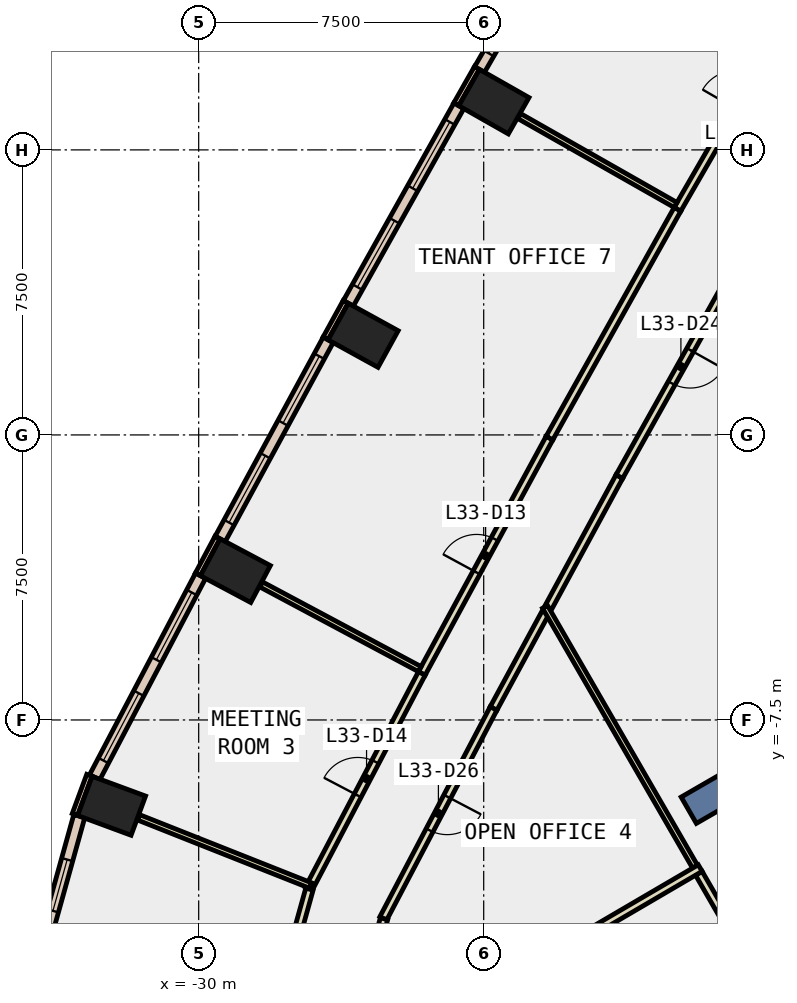
"""IFC4 building model, lengths in metres.
Left out: names, types, materials, properties, quantities, classifications, styles, units other than length and angle.
Written with IfcOpenShell. Run it as: python <this file> out.ifc"""

import sys

from ifc_helpers import new_model, si_unit, direction, frame, frame_2d, origin, origin_2d, place, context, subcontext, project, spatial, rectangle, extrude, element, fill, save


model = new_model("IFC4")
c1 = context("Model", 3, precision=1e-05, world=origin(), true_north=direction((0.0, 1.0)))
c2 = subcontext(c1, "Body", "Model", "MODEL_VIEW")
j1 = project(units=[si_unit("LENGTHUNIT", "METRE"), si_unit("PLANEANGLEUNIT", "RADIAN")], contexts=[c1])
p1 = place(None, origin())
s1 = spatial("IfcSite", under=j1, at=p1, CompositionType="ELEMENT")
p2 = place(p1, origin())
s2 = spatial("IfcBuilding", under=s1, at=p2, CompositionType="ELEMENT")
p3 = place(p2, frame((0.0, 0.0, 150.8)))
s3 = spatial("IfcBuildingStorey", under=s2, at=p3, CompositionType="ELEMENT", Elevation=150.8)
for number, where, z_axis, x_axis in (
    (1, (-22.232, 8.769, -0.4), (0.0, 0.0, 1.0), (0.494, 0.869, 0.0)),
    (2, (-25.673, 2.622, -0.4), (0.0, 0.0, 1.0), (0.482, 0.876, 0.0)),
    (3, (-29.034, -3.571, -0.4), (0.0, 0.0, 1.0), (0.47, 0.883, 0.0)),
    (4, (-32.292, -9.758, -0.4), (0.0, 0.0, 1.0), (0.347, 0.938, 0.0)),
):
    element("IfcColumn", number, at=place(p3, frame(where, z_axis=z_axis, x_axis=x_axis)), inside=s3, PredefinedType="COLUMN", context=c2, shape_type="SweptSolid", body=[
        extrude(rectangle(XDim=1.1, YDim=1.5, at=origin_2d()), origin(), (0.0, 0.0, 1.0), 4.2),
    ])
p4 = place(p3, frame((-9.31, -5.375, -0.4), z_axis=(0.0, 0.0, 1.0), x_axis=(-0.866017533419, -0.500013631625, 0.0)))
e5 = element("IfcWall", 5, at=p4, inside=s3, PredefinedType="SHEAR", context=c2, shape_type="SweptSolid", body=[
    extrude(rectangle(XDim=9.0, YDim=0.8, at=frame_2d((4.5, 0.0))), origin(), (0.0, 0.0, 1.0), 4.2),
])
for number, where, z_axis, x_axis in (
    (6, (-22.678, 9.655, 0.0), (0.0, 0.0, 1.0), (-0.495, -0.869, 0.0)),
    (7, (-26.131, 3.502, 0.0), (0.0, 0.0, 1.0), (-0.482, -0.876, 0.0)),
):
    element("IfcWall", number, at=place(p3, frame(where, z_axis=z_axis, x_axis=x_axis)), inside=s3, PredefinedType="STANDARD", context=c2, shape_type="SweptSolid", body=[
        extrude(rectangle(XDim=1.1, YDim=0.15, at=frame_2d((0.55, 0.0))), origin(), (0.0, 0.0, 1.0), 3.8),
    ])
for number, where, z_axis, x_axis in (
    (8, (-29.503, -2.698, 0.0), (0.0, 0.0, 1.0), (-0.47, -0.883, 0.0)),
    (9, (-32.875, -8.956, 0.0), (0.0, 0.0, 1.0), (-0.346, -0.938, 0.0)),
):
    element("IfcWall", number, at=place(p3, frame(where, z_axis=z_axis, x_axis=x_axis)), inside=s3, PredefinedType="STANDARD", context=c2, shape_type="SweptSolid", body=[
        extrude(rectangle(XDim=1.1, YDim=0.15, at=frame_2d((0.55, 0.0))), origin(), (0.0, 0.0, 1.0), 3.8),
    ])
p5 = place(p3, frame((-19.631, 14.774, 0.0), z_axis=(0.0, 0.0, 1.0), x_axis=(-0.500061823953, -0.865989706766, 0.0)))
e10 = element("IfcWall", 10, at=p5, inside=s3, PredefinedType="STANDARD", context=c2, shape_type="SweptSolid", body=[
    extrude(rectangle(XDim=5.957, YDim=0.3, at=frame_2d((2.979, 0.0))), origin(), (0.0, 0.0, 1.0), 3.8),
])
p6 = place(p5, frame((0.489, 0.0, 0.9)))
e11 = element("IfcOpeningElement", 11, at=p6, cuts=e10, PredefinedType="OPENING", context=c2, shape_type="SweptSolid", body=[
    extrude(rectangle(XDim=2.0, YDim=2.6, at=frame_2d((1.0, 1.3))), frame((0.0, 0.16, 0.0), z_axis=(0.0, -1.0, 0.0), x_axis=(1.0, 0.0, 0.0)), (0.0, 0.0, 1.0), 0.32),
])
p7 = place(p5, frame((3.468, 0.0, 0.9)))
e12 = element("IfcOpeningElement", 12, at=p7, cuts=e10, PredefinedType="OPENING", context=c2, shape_type="SweptSolid", body=[
    extrude(rectangle(XDim=2.0, YDim=2.6, at=frame_2d((1.0, 1.3))), frame((0.0, 0.16, 0.0), z_axis=(0.0, -1.0, 0.0), x_axis=(1.0, 0.0, 0.0)), (0.0, 0.0, 1.0), 0.32),
])
p8 = place(p3, frame((-23.153, 8.661, 0.0), z_axis=(0.0, 0.0, 1.0), x_axis=(-0.488354983501, -0.872645065356, 0.0)))
e13 = element("IfcWall", 13, at=p8, inside=s3, PredefinedType="STANDARD", context=c2, shape_type="SweptSolid", body=[
    extrude(rectangle(XDim=5.957, YDim=0.3, at=frame_2d((2.978, 0.0))), origin(), (0.0, 0.0, 1.0), 3.8),
])
p9 = place(p8, frame((0.489, 0.0, 0.9)))
e14 = element("IfcOpeningElement", 14, at=p9, cuts=e13, PredefinedType="OPENING", context=c2, shape_type="SweptSolid", body=[
    extrude(rectangle(XDim=2.0, YDim=2.6, at=frame_2d((1.0, 1.3))), frame((0.0, 0.16, 0.0), z_axis=(0.0, -1.0, 0.0), x_axis=(1.0, 0.0, 0.0)), (0.0, 0.0, 1.0), 0.32),
])
p10 = place(p8, frame((3.467, 0.0, 0.9)))
e15 = element("IfcOpeningElement", 15, at=p10, cuts=e13, PredefinedType="OPENING", context=c2, shape_type="SweptSolid", body=[
    extrude(rectangle(XDim=2.0, YDim=2.6, at=frame_2d((1.0, 1.3))), frame((0.0, 0.16, 0.0), z_axis=(0.0, -1.0, 0.0), x_axis=(1.0, 0.0, 0.0)), (0.0, 0.0, 1.0), 0.32),
])
p11 = place(p3, frame((-26.592, 2.501, 0.0), z_axis=(0.0, 0.0, 1.0), x_axis=(-0.476970695077, -0.878919197673, 0.0)))
e16 = element("IfcWall", 16, at=p11, inside=s3, PredefinedType="STANDARD", context=c2, shape_type="SweptSolid", body=[
    extrude(rectangle(XDim=5.958, YDim=0.3, at=frame_2d((2.979, 0.0))), origin(), (0.0, 0.0, 1.0), 3.8),
])
p12 = place(p11, frame((0.49, 0.0, 0.9)))
e17 = element("IfcOpeningElement", 17, at=p12, cuts=e16, PredefinedType="OPENING", context=c2, shape_type="SweptSolid", body=[
    extrude(rectangle(XDim=2.0, YDim=2.6, at=frame_2d((1.0, 1.3))), frame((0.0, 0.16, 0.0), z_axis=(0.0, -1.0, 0.0), x_axis=(1.0, 0.0, 0.0)), (0.0, 0.0, 1.0), 0.32),
])
p13 = place(p11, frame((3.469, 0.0, 0.9)))
e18 = element("IfcOpeningElement", 18, at=p13, cuts=e16, PredefinedType="OPENING", context=c2, shape_type="SweptSolid", body=[
    extrude(rectangle(XDim=2.0, YDim=2.6, at=frame_2d((1.0, 1.3))), frame((0.0, 0.16, 0.0), z_axis=(0.0, -1.0, 0.0), x_axis=(1.0, 0.0, 0.0)), (0.0, 0.0, 1.0), 0.32),
])
p14 = place(p3, frame((-29.951, -3.705, 0.0), z_axis=(0.0, 0.0, 1.0), x_axis=(-0.465104650407, -0.885255705528, 0.0)))
e19 = element("IfcWall", 19, at=p14, inside=s3, PredefinedType="STANDARD", context=c2, shape_type="SweptSolid", body=[
    extrude(rectangle(XDim=5.99, YDim=0.3, at=frame_2d((2.995, 0.0))), origin(), (0.0, 0.0, 1.0), 3.8),
])
p15 = place(p14, frame((0.498, 0.0, 0.9)))
e20 = element("IfcOpeningElement", 20, at=p15, cuts=e19, PredefinedType="OPENING", context=c2, shape_type="SweptSolid", body=[
    extrude(rectangle(XDim=2.0, YDim=2.6, at=frame_2d((1.0, 1.3))), frame((0.0, 0.16, 0.0), z_axis=(0.0, -1.0, 0.0), x_axis=(1.0, 0.0, 0.0)), (0.0, 0.0, 1.0), 0.32),
])
p16 = place(p14, frame((3.493, 0.0, 0.9)))
e21 = element("IfcOpeningElement", 21, at=p16, cuts=e19, PredefinedType="OPENING", context=c2, shape_type="SweptSolid", body=[
    extrude(rectangle(XDim=2.0, YDim=2.6, at=frame_2d((1.0, 1.3))), frame((0.0, 0.16, 0.0), z_axis=(0.0, -1.0, 0.0), x_axis=(1.0, 0.0, 0.0)), (0.0, 0.0, 1.0), 0.32),
])
p17 = place(p3, frame((-33.142, -10.029, 0.0), z_axis=(0.0, 0.0, 1.0), x_axis=(-0.26799398221, -0.963420585985, 0.0)))
e22 = element("IfcWall", 22, at=p17, inside=s3, PredefinedType="STANDARD", context=c2, shape_type="SweptSolid", body=[
    extrude(rectangle(XDim=3.776, YDim=0.3, at=frame_2d((1.888, 0.0))), origin(), (0.0, 0.0, 1.0), 3.8),
])
p18 = place(p17, frame((1.188, 0.0, 0.9)))
e23 = element("IfcOpeningElement", 23, at=p18, cuts=e22, PredefinedType="OPENING", context=c2, shape_type="SweptSolid", body=[
    extrude(rectangle(XDim=1.4, YDim=2.6, at=frame_2d((0.7, 1.3))), frame((0.0, 0.16, 0.0), z_axis=(0.0, -1.0, 0.0), x_axis=(1.0, 0.0, 0.0)), (0.0, 0.0, 1.0), 0.32),
])
p19 = place(p3, frame((-18.93, -1.095, 0.0), z_axis=(0.0, 0.0, 1.0), x_axis=(-0.476854303058, -0.878982351162, 0.0)))
e24 = element("IfcWall", 24, at=p19, inside=s3, PredefinedType="PARTITIONING", context=c2, shape_type="SweptSolid", body=[
    extrude(rectangle(XDim=3.924, YDim=0.2, at=frame_2d((1.962, 0.0))), origin(), (0.0, 0.0, 1.0), 3.8),
])
p20 = place(p3, frame((-15.692, 4.689, 0.0), z_axis=(0.0, 0.0, 1.0), x_axis=(-0.48849233301, -0.872568186786, 0.0)))
e25 = element("IfcWall", 25, at=p20, inside=s3, PredefinedType="PARTITIONING", context=c2, shape_type="SweptSolid", body=[
    extrude(rectangle(XDim=6.629, YDim=0.2, at=frame_2d((3.314, 0.0))), origin(), (0.0, 0.0, 1.0), 3.8),
])
p21 = place(p20, frame((2.814, 0.0, 0.0)))
e26 = element("IfcOpeningElement", 26, at=p21, cuts=e25, PredefinedType="OPENING", context=c2, shape_type="SweptSolid", body=[
    extrude(rectangle(XDim=1.0, YDim=2.1, at=frame_2d((0.5, 1.05))), frame((0.0, 0.11, 0.0), z_axis=(0.0, -1.0, 0.0), x_axis=(1.0, 0.0, 0.0)), (0.0, 0.0, 1.0), 0.22),
])
p22 = place(p3, frame((-20.873, -4.676, 0.0), z_axis=(0.0, 0.0, 1.0), x_axis=(-0.476781985736, -0.879021579984, 0.0)))
e27 = element("IfcWall", 27, at=p22, inside=s3, PredefinedType="PARTITIONING", context=c2, shape_type="SweptSolid", body=[
    extrude(rectangle(XDim=2.869, YDim=0.2, at=frame_2d((1.435, 0.0))), origin(), (0.0, 0.0, 1.0), 3.8),
])
p23 = place(p3, frame((-22.241, -7.198, 0.0), z_axis=(0.0, 0.0, 1.0), x_axis=(-0.465089990515, -0.885263407536, 0.0)))
e28 = element("IfcWall", 28, at=p23, inside=s3, PredefinedType="PARTITIONING", context=c2, shape_type="SweptSolid", body=[
    extrude(rectangle(XDim=6.24, YDim=0.2, at=frame_2d((3.12, 0.0))), origin(), (0.0, 0.0, 1.0), 3.8),
])
p24 = place(p23, frame((2.62, 0.0, 0.0)))
e29 = element("IfcOpeningElement", 29, at=p24, cuts=e28, PredefinedType="OPENING", context=c2, shape_type="SweptSolid", body=[
    extrude(rectangle(XDim=1.0, YDim=2.1, at=frame_2d((0.5, 1.05))), frame((0.0, 0.11, 0.0), z_axis=(0.0, -1.0, 0.0), x_axis=(1.0, 0.0, 0.0)), (0.0, 0.0, 1.0), 0.22),
])
p25 = place(p3, frame((-25.123, -12.73, 0.0), z_axis=(0.0, 0.0, 1.0), x_axis=(-0.268139825244, -0.963380005044, 0.0)))
e30 = element("IfcWall", 30, at=p25, inside=s3, PredefinedType="PARTITIONING", context=c2, shape_type="SweptSolid", body=[
    extrude(rectangle(XDim=1.726, YDim=0.2, at=frame_2d((0.863, 0.0))), origin(), (0.0, 0.0, 1.0), 3.8),
])
p26 = place(p3, frame((-17.402, 5.936, 0.0), z_axis=(0.0, 0.0, 1.0), x_axis=(0.500135788517, 0.865946992052, 0.0)))
e31 = element("IfcWall", 31, at=p26, inside=s3, PredefinedType="PARTITIONING", context=c2, shape_type="SweptSolid", body=[
    extrude(rectangle(XDim=6.97, YDim=0.2, at=frame_2d((3.485, 0.0))), origin(), (0.0, 0.0, 1.0), 3.8),
])
p27 = place(p26, frame((3.06, 0.0, 0.0)))
e32 = element("IfcOpeningElement", 32, at=p27, cuts=e31, PredefinedType="OPENING", context=c2, shape_type="SweptSolid", body=[
    extrude(rectangle(XDim=1.0, YDim=2.1, at=frame_2d((0.5, 1.05))), frame((0.0, 0.11, 0.0), z_axis=(0.0, -1.0, 0.0), x_axis=(1.0, 0.0, 0.0)), (0.0, 0.0, 1.0), 0.22),
])
p28 = place(p3, frame((-24.13, -6.275, 0.0), z_axis=(0.0, 0.0, 1.0), x_axis=(0.476981750532, 0.878913198023, 0.0)))
e33 = element("IfcWall", 33, at=p28, inside=s3, PredefinedType="PARTITIONING", context=c2, shape_type="SweptSolid", body=[
    extrude(rectangle(XDim=7.046, YDim=0.2, at=frame_2d((3.523, 0.0))), origin(), (0.0, 0.0, 1.0), 3.8),
])
p29 = place(p28, frame((3.023, 0.0, 0.0)))
e34 = element("IfcOpeningElement", 34, at=p29, cuts=e33, PredefinedType="OPENING", context=c2, shape_type="SweptSolid", body=[
    extrude(rectangle(XDim=1.0, YDim=2.1, at=frame_2d((0.5, 1.05))), frame((0.0, 0.11, 0.0), z_axis=(0.0, -1.0, 0.0), x_axis=(1.0, 0.0, 0.0)), (0.0, 0.0, 1.0), 0.22),
])
p30 = place(p3, frame((-20.769, -0.082, 0.0), z_axis=(0.0, 0.0, 1.0), x_axis=(0.488387759141, 0.872626722443, 0.0)))
e35 = element("IfcWall", 35, at=p30, inside=s3, PredefinedType="PARTITIONING", context=c2, shape_type="SweptSolid", body=[
    extrude(rectangle(XDim=6.896, YDim=0.2, at=frame_2d((3.448, 0.0))), origin(), (0.0, 0.0, 1.0), 3.8),
])
p31 = place(p3, frame((-27.106, -11.944, 0.0), z_axis=(0.0, 0.0, 1.0), x_axis=(0.464985599417, 0.885318243534, 0.0)))
e36 = element("IfcWall", 36, at=p31, inside=s3, PredefinedType="PARTITIONING", context=c2, shape_type="SweptSolid", body=[
    extrude(rectangle(XDim=6.402, YDim=0.2, at=frame_2d((3.201, 0.0))), origin(), (0.0, 0.0, 1.0), 3.8),
])
p32 = place(p31, frame((2.776, 0.0, 0.0)))
e37 = element("IfcOpeningElement", 37, at=p32, cuts=e36, PredefinedType="OPENING", context=c2, shape_type="SweptSolid", body=[
    extrude(rectangle(XDim=1.0, YDim=2.1, at=frame_2d((0.5, 1.05))), frame((0.0, 0.11, 0.0), z_axis=(0.0, -1.0, 0.0), x_axis=(1.0, 0.0, 0.0)), (0.0, 0.0, 1.0), 0.22),
])
p33 = place(p3, frame((-27.76, -14.376, 0.0), z_axis=(0.0, 0.0, 1.0), x_axis=(0.267909096687, 0.963444194498, 0.0)))
e38 = element("IfcWall", 38, at=p33, inside=s3, PredefinedType="PARTITIONING", context=c2, shape_type="SweptSolid", body=[
    extrude(rectangle(XDim=2.516, YDim=0.2, at=frame_2d((1.258, 0.0))), origin(), (0.0, 0.0, 1.0), 3.8),
])
p34 = place(p3, frame((-16.939, -11.36, 0.0), z_axis=(0.0, 0.0, 1.0), x_axis=(-0.500053473428, 0.865994528685, 0.0)))
e39 = element("IfcWall", 39, at=p34, inside=s3, PredefinedType="PARTITIONING", context=c2, shape_type="SweptSolid", body=[
    extrude(rectangle(XDim=7.895, YDim=0.15, at=frame_2d((3.948, 0.0))), origin(), (0.0, 0.0, 1.0), 3.8),
])
p35 = place(p3, frame((-15.18, -14.408, 0.0), z_axis=(0.0, 0.0, 1.0), x_axis=(-0.499968694491, 0.866043477274, 0.0)))
e40 = element("IfcWall", 40, at=p35, inside=s3, PredefinedType="PARTITIONING", context=c2, shape_type="SweptSolid", body=[
    extrude(rectangle(XDim=3.319, YDim=0.2, at=frame_2d((1.659, 0.0))), origin(), (0.0, 0.0, 1.0), 3.8),
])
p36 = place(p3, frame((-16.803, -11.397, 0.0), z_axis=(0.0, 0.0, 1.0), x_axis=(-0.863203941699, -0.504855380318, 0.0)))
e41 = element("IfcWall", 41, at=p36, inside=s3, PredefinedType="PARTITIONING", context=c2, shape_type="SweptSolid", body=[
    extrude(rectangle(XDim=8.232, YDim=0.2, at=frame_2d((4.116, 0.0))), origin(), (0.0, 0.0, 1.0), 3.8),
])
p37 = place(p3, frame((-17.451, 6.051, 0.0), z_axis=(0.0, 0.0, 1.0), x_axis=(-0.869409691741, 0.494091882049, 0.0)))
e42 = element("IfcWall", 42, at=p37, inside=s3, PredefinedType="PARTITIONING", context=c2, shape_type="SweptSolid", body=[
    extrude(rectangle(XDim=4.73, YDim=0.15, at=frame_2d((2.365, 0.0))), origin(), (0.0, 0.0, 1.0), 3.8),
])
p38 = place(p3, frame((-24.182, -6.162, 0.0), z_axis=(0.0, 0.0, 1.0), x_axis=(-0.88214427755, 0.470979270866, 0.0)))
e43 = element("IfcWall", 43, at=p38, inside=s3, PredefinedType="PARTITIONING", context=c2, shape_type="SweptSolid", body=[
    extrude(rectangle(XDim=4.731, YDim=0.15, at=frame_2d((2.365, 0.0))), origin(), (0.0, 0.0, 1.0), 3.8),
])
p39 = place(p3, frame((-27.059, -11.855, 0.0), z_axis=(0.0, 0.0, 1.0), x_axis=(-0.92964843089, 0.368447818481, 0.0)))
e44 = element("IfcWall", 44, at=p39, inside=s3, PredefinedType="PARTITIONING", context=c2, shape_type="SweptSolid", body=[
    extrude(rectangle(XDim=4.866, YDim=0.15, at=frame_2d((2.433, 0.0))), origin(), (0.0, 0.0, 1.0), 3.8),
])
p40 = place(p7, origin())
e45 = element("IfcWindow", 45, at=p40, inside=s3, PartitioningType="SINGLE_PANEL", PredefinedType="WINDOW", context=c2, shape_type="SweptSolid", body=[
    extrude(rectangle(XDim=2.0, YDim=2.6, at=frame_2d((1.0, 1.3))), frame((0.0, 0.03, 0.0), z_axis=(0.0, -1.0, 0.0), x_axis=(1.0, 0.0, 0.0)), (0.0, 0.0, 1.0), 0.06),
])
fill(e12, e45)
p41 = place(p9, origin())
e46 = element("IfcWindow", 46, at=p41, inside=s3, PartitioningType="SINGLE_PANEL", PredefinedType="WINDOW", context=c2, shape_type="SweptSolid", body=[
    extrude(rectangle(XDim=2.0, YDim=2.6, at=frame_2d((1.0, 1.3))), frame((0.0, 0.03, 0.0), z_axis=(0.0, -1.0, 0.0), x_axis=(1.0, 0.0, 0.0)), (0.0, 0.0, 1.0), 0.06),
])
fill(e14, e46)
p42 = place(p10, origin())
e47 = element("IfcWindow", 47, at=p42, inside=s3, PartitioningType="SINGLE_PANEL", PredefinedType="WINDOW", context=c2, shape_type="SweptSolid", body=[
    extrude(rectangle(XDim=2.0, YDim=2.6, at=frame_2d((1.0, 1.3))), frame((0.0, 0.03, 0.0), z_axis=(0.0, -1.0, 0.0), x_axis=(1.0, 0.0, 0.0)), (0.0, 0.0, 1.0), 0.06),
])
fill(e15, e47)
p43 = place(p12, origin())
e48 = element("IfcWindow", 48, at=p43, inside=s3, PartitioningType="SINGLE_PANEL", PredefinedType="WINDOW", context=c2, shape_type="SweptSolid", body=[
    extrude(rectangle(XDim=2.0, YDim=2.6, at=frame_2d((1.0, 1.3))), frame((0.0, 0.03, 0.0), z_axis=(0.0, -1.0, 0.0), x_axis=(1.0, 0.0, 0.0)), (0.0, 0.0, 1.0), 0.06),
])
fill(e17, e48)
p44 = place(p13, origin())
e49 = element("IfcWindow", 49, at=p44, inside=s3, PartitioningType="SINGLE_PANEL", PredefinedType="WINDOW", context=c2, shape_type="SweptSolid", body=[
    extrude(rectangle(XDim=2.0, YDim=2.6, at=frame_2d((1.0, 1.3))), frame((0.0, 0.03, 0.0), z_axis=(0.0, -1.0, 0.0), x_axis=(1.0, 0.0, 0.0)), (0.0, 0.0, 1.0), 0.06),
])
fill(e18, e49)
p45 = place(p15, origin())
e50 = element("IfcWindow", 50, at=p45, inside=s3, PartitioningType="SINGLE_PANEL", PredefinedType="WINDOW", context=c2, shape_type="SweptSolid", body=[
    extrude(rectangle(XDim=2.0, YDim=2.6, at=frame_2d((1.0, 1.3))), frame((0.0, 0.03, 0.0), z_axis=(0.0, -1.0, 0.0), x_axis=(1.0, 0.0, 0.0)), (0.0, 0.0, 1.0), 0.06),
])
fill(e20, e50)
p46 = place(p16, origin())
e51 = element("IfcWindow", 51, at=p46, inside=s3, PartitioningType="SINGLE_PANEL", PredefinedType="WINDOW", context=c2, shape_type="SweptSolid", body=[
    extrude(rectangle(XDim=2.0, YDim=2.6, at=frame_2d((1.0, 1.3))), frame((0.0, 0.03, 0.0), z_axis=(0.0, -1.0, 0.0), x_axis=(1.0, 0.0, 0.0)), (0.0, 0.0, 1.0), 0.06),
])
fill(e21, e51)
p47 = place(p18, origin())
e52 = element("IfcWindow", 52, at=p47, inside=s3, PartitioningType="SINGLE_PANEL", PredefinedType="WINDOW", context=c2, shape_type="SweptSolid", body=[
    extrude(rectangle(XDim=1.4, YDim=2.6, at=frame_2d((0.7, 1.3))), frame((0.0, 0.03, 0.0), z_axis=(0.0, -1.0, 0.0), x_axis=(1.0, 0.0, 0.0)), (0.0, 0.0, 1.0), 0.06),
])
fill(e23, e52)
p48 = place(p29, origin())
e53 = element("IfcDoor", 53, at=p48, inside=s3, OperationType="SINGLE_SWING_RIGHT", PredefinedType="DOOR", context=c2, shape_type="SweptSolid", body=[
    extrude(rectangle(XDim=1.0, YDim=2.1, at=frame_2d((0.5, 1.05))), frame((0.0, 0.025, 0.0), z_axis=(0.0, -1.0, 0.0), x_axis=(1.0, 0.0, 0.0)), (0.0, 0.0, 1.0), 0.05),
])
fill(e34, e53)
p49 = place(p32, origin())
e54 = element("IfcDoor", 54, at=p49, inside=s3, OperationType="SINGLE_SWING_LEFT", PredefinedType="DOOR", context=c2, shape_type="SweptSolid", body=[
    extrude(rectangle(XDim=1.0, YDim=2.1, at=frame_2d((0.5, 1.05))), frame((0.0, 0.025, 0.0), z_axis=(0.0, -1.0, 0.0), x_axis=(1.0, 0.0, 0.0)), (0.0, 0.0, 1.0), 0.05),
])
fill(e37, e54)
p50 = place(p21, origin())
e55 = element("IfcDoor", 55, at=p50, inside=s3, OperationType="SINGLE_SWING_LEFT", PredefinedType="DOOR", context=c2, shape_type="SweptSolid", body=[
    extrude(rectangle(XDim=1.0, YDim=2.1, at=frame_2d((0.5, 1.05))), frame((0.0, 0.025, 0.0), z_axis=(0.0, -1.0, 0.0), x_axis=(1.0, 0.0, 0.0)), (0.0, 0.0, 1.0), 0.05),
])
fill(e26, e55)
p51 = place(p24, origin())
e56 = element("IfcDoor", 56, at=p51, inside=s3, OperationType="SINGLE_SWING_LEFT", PredefinedType="DOOR", context=c2, shape_type="SweptSolid", body=[
    extrude(rectangle(XDim=1.0, YDim=2.1, at=frame_2d((0.5, 1.05))), frame((0.0, 0.025, 0.0), z_axis=(0.0, -1.0, 0.0), x_axis=(1.0, 0.0, 0.0)), (0.0, 0.0, 1.0), 0.05),
])
fill(e29, e56)
save(model, sys.argv[1])
